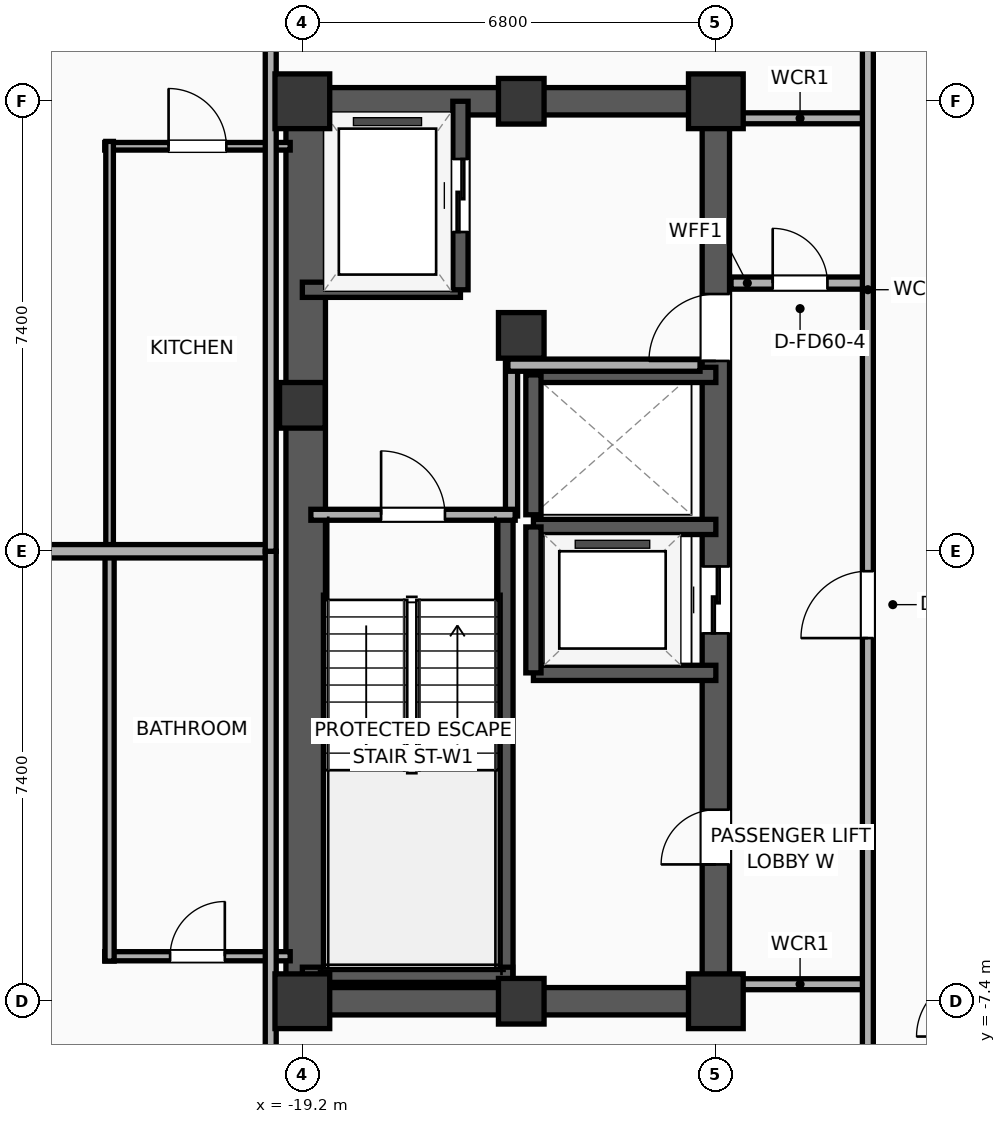
"""IFC4 building model, lengths in metres.
Left out: names, types, materials, properties, quantities, classifications, styles, units other than length and angle.
Written with IfcOpenShell. Run it as: python <this file> out.ifc"""

import sys

from ifc_helpers import new_model, si_unit, direction, frame, frame_2d, origin, origin_2d, place, context, subcontext, project, spatial, rectangle, extrude, element, fill, save


model = new_model("IFC4")
c1 = context("Model", 3, precision=1e-05, world=origin(), true_north=direction((0.0, 1.0)))
c2 = subcontext(c1, "Body", "Model", "MODEL_VIEW")
j1 = project(units=[si_unit("LENGTHUNIT", "METRE"), si_unit("PLANEANGLEUNIT", "RADIAN")], contexts=[c1])
p1 = place(None, origin())
s1 = spatial("IfcSite", under=j1, at=p1, CompositionType="ELEMENT")
p2 = place(p1, origin())
s2 = spatial("IfcBuilding", under=s1, at=p2, CompositionType="ELEMENT")
p3 = place(p2, frame((0.0, 0.0, 187.2)))
s3 = spatial("IfcBuildingStorey", under=s2, at=p3, CompositionType="ELEMENT", Elevation=187.2)
p4 = place(p3, frame((-19.2, -7.4, 0.0), z_axis=(0.0, 0.0, 1.0), x_axis=(1.0, 0.0, 0.0)))
e1 = element("IfcColumn", 1, at=p4, inside=s3, PredefinedType="COLUMN", context=c2, shape_type="SweptSolid", body=[
    extrude(rectangle(XDim=0.9, YDim=0.9, at=origin_2d()), origin(), (0.0, 0.0, 1.0), 3.9),
])
p5 = place(p3, frame((-19.2, 2.4, 0.0), z_axis=(0.0, 0.0, 1.0), x_axis=(1.0, 0.0, 0.0)))
e2 = element("IfcColumn", 2, at=p5, inside=s3, PredefinedType="COLUMN", context=c2, shape_type="SweptSolid", body=[
    extrude(rectangle(XDim=0.75, YDim=0.75, at=origin_2d()), origin(), (0.0, 0.0, 1.0), 3.9),
])
p6 = place(p3, frame((-19.2, 7.4, 0.0), z_axis=(0.0, 0.0, 1.0), x_axis=(1.0, 0.0, 0.0)))
e3 = element("IfcColumn", 3, at=p6, inside=s3, PredefinedType="COLUMN", context=c2, shape_type="SweptSolid", body=[
    extrude(rectangle(XDim=0.9, YDim=0.9, at=origin_2d()), origin(), (0.0, 0.0, 1.0), 3.9),
])
for number, where, z_axis, x_axis in (
    (4, (-15.6, -7.4, 0.0), (0.0, 0.0, 1.0), (1.0, 0.0, 0.0)),
    (5, (-15.6, 7.4, 0.0), (0.0, 0.0, 1.0), (1.0, 0.0, 0.0)),
):
    element("IfcColumn", number, at=place(p3, frame(where, z_axis=z_axis, x_axis=x_axis)), inside=s3, PredefinedType="COLUMN", context=c2, shape_type="SweptSolid", body=[
        extrude(rectangle(XDim=0.75, YDim=0.75, at=origin_2d()), origin(), (0.0, 0.0, 1.0), 3.9),
    ])
p7 = place(p3, frame((-12.4, -7.4, 0.0), z_axis=(0.0, 0.0, 1.0), x_axis=(1.0, 0.0, 0.0)))
e6 = element("IfcColumn", 6, at=p7, inside=s3, PredefinedType="COLUMN", context=c2, shape_type="SweptSolid", body=[
    extrude(rectangle(XDim=0.9, YDim=0.9, at=origin_2d()), origin(), (0.0, 0.0, 1.0), 3.9),
])
p8 = place(p3, frame((-15.6, 3.55, 0.0), z_axis=(0.0, 0.0, 1.0), x_axis=(1.0, 0.0, 0.0)))
e7 = element("IfcColumn", 7, at=p8, inside=s3, PredefinedType="COLUMN", context=c2, shape_type="SweptSolid", body=[
    extrude(rectangle(XDim=0.75, YDim=0.75, at=origin_2d()), origin(), (0.0, 0.0, 1.0), 3.9),
])
p9 = place(p3, frame((-12.4, 7.4, 0.0), z_axis=(0.0, 0.0, 1.0), x_axis=(1.0, 0.0, 0.0)))
e8 = element("IfcColumn", 8, at=p9, inside=s3, PredefinedType="COLUMN", context=c2, shape_type="SweptSolid", body=[
    extrude(rectangle(XDim=0.9, YDim=0.9, at=origin_2d()), origin(), (0.0, 0.0, 1.0), 3.9),
])
for number, where, z_axis, x_axis in (
    (9, (-19.425, -7.4, 0.0), (0.0, 0.0, 1.0), (1.0, 0.0, 0.0)),
    (10, (-19.425, 7.4, 0.0), (0.0, 0.0, 1.0), (1.0, 0.0, 0.0)),
):
    element("IfcWall", number, at=place(p3, frame(where, z_axis=z_axis, x_axis=x_axis)), inside=s3, PredefinedType="SHEAR", context=c2, shape_type="SweptSolid", body=[
        extrude(rectangle(XDim=7.25, YDim=0.45, at=frame_2d((3.625, 0.0))), origin(), (0.0, 0.0, 1.0), 3.65),
    ])
p10 = place(p3, frame((-19.145, -7.4, 0.0), z_axis=(0.0, 0.0, 1.0), x_axis=(0.0, 1.0, 0.0)))
e11 = element("IfcWall", 11, at=p10, inside=s3, PredefinedType="SHEAR", context=c2, shape_type="SweptSolid", body=[
    extrude(rectangle(XDim=14.8, YDim=0.65, at=frame_2d((7.4, 0.0))), origin(), (0.0, 0.0, 1.0), 3.65),
])
p11 = place(p3, frame((-12.4, -7.4, 0.0), z_axis=(0.0, 0.0, 1.0), x_axis=(0.0, 1.0, 0.0)))
e12 = element("IfcWall", 12, at=p11, inside=s3, PredefinedType="SHEAR", context=c2, shape_type="SweptSolid", body=[
    extrude(rectangle(XDim=14.8, YDim=0.45, at=frame_2d((7.4, 0.0))), origin(), (0.0, 0.0, 1.0), 3.65),
])
p12 = place(p11, frame((6.05, 0.0, 0.0)))
e13 = element("IfcOpeningElement", 13, at=p12, cuts=e12, PredefinedType="OPENING", context=c2, shape_type="SweptSolid", body=[
    extrude(rectangle(XDim=1.1, YDim=2.05, at=frame_2d((0.55, 1.025))), frame((0.0, 0.235, 0.0), z_axis=(0.0, -1.0, 0.0), x_axis=(1.0, 0.0, 0.0)), (0.0, 0.0, 1.0), 0.47),
])
p13 = place(p11, frame((10.53, 0.0, 0.0)))
e14 = element("IfcOpeningElement", 14, at=p13, cuts=e12, PredefinedType="OPENING", context=c2, shape_type="SweptSolid", body=[
    extrude(rectangle(XDim=1.1, YDim=2.05, at=frame_2d((0.55, 1.025))), frame((0.0, 0.235, 0.0), z_axis=(0.0, -1.0, 0.0), x_axis=(1.0, 0.0, 0.0)), (0.0, 0.0, 1.0), 0.47),
])
p14 = place(p11, frame((2.25, 0.0, 0.0)))
e15 = element("IfcOpeningElement", 15, at=p14, cuts=e12, PredefinedType="OPENING", context=c2, shape_type="SweptSolid", body=[
    extrude(rectangle(XDim=0.9, YDim=2.05, at=frame_2d((0.45, 1.025))), frame((0.0, 0.235, 0.0), z_axis=(0.0, -1.0, 0.0), x_axis=(1.0, 0.0, 0.0)), (0.0, 0.0, 1.0), 0.47),
])
p15 = place(p3, frame((-15.86, -7.085, 0.0), z_axis=(0.0, 0.0, 1.0), x_axis=(0.0, 1.0, 0.0)))
e16 = element("IfcWall", 16, at=p15, inside=s3, PredefinedType="SOLIDWALL", context=c2, shape_type="SweptSolid", body=[
    extrude(rectangle(XDim=7.685, YDim=0.25, at=frame_2d((3.843, 0.0))), origin(), (0.0, 0.0, 1.0), 3.65),
])
p16 = place(p3, frame((-19.2, -6.965, 0.0), z_axis=(0.0, 0.0, 1.0), x_axis=(1.0, 0.0, 0.0)))
e17 = element("IfcWall", 17, at=p16, inside=s3, PredefinedType="SOLIDWALL", context=c2, shape_type="SweptSolid", body=[
    extrude(rectangle(XDim=3.46, YDim=0.25, at=frame_2d((1.73, 0.0))), origin(), (0.0, 0.0, 1.0), 3.65),
])
p17 = place(p3, frame((-19.2, 4.3, 0.0), z_axis=(0.0, 0.0, 1.0), x_axis=(1.0, 0.0, 0.0)))
e18 = element("IfcWall", 18, at=p17, inside=s3, PredefinedType="SOLIDWALL", context=c2, shape_type="SweptSolid", body=[
    extrude(rectangle(XDim=2.6, YDim=0.25, at=frame_2d((1.3, 0.0))), origin(), (0.0, 0.0, 1.0), 3.65),
])
p18 = place(p3, frame((-16.6, 4.3, 0.0), z_axis=(0.0, 0.0, 1.0), x_axis=(0.0, 1.0, 0.0)))
e19 = element("IfcWall", 19, at=p18, inside=s3, PredefinedType="SOLIDWALL", context=c2, shape_type="SweptSolid", body=[
    extrude(rectangle(XDim=3.1, YDim=0.25, at=frame_2d((1.55, 0.0))), origin(), (0.0, 0.0, 1.0), 3.65),
])
p19 = place(p18, frame((0.95, 0.0, 0.0)))
e20 = element("IfcOpeningElement", 20, at=p19, cuts=e19, PredefinedType="OPENING", context=c2, shape_type="SweptSolid", body=[
    extrude(rectangle(XDim=1.2, YDim=2.05, at=frame_2d((0.6, 1.025))), frame((0.0, 0.135, 0.0), z_axis=(0.0, -1.0, 0.0), x_axis=(1.0, 0.0, 0.0)), (0.0, 0.0, 1.0), 0.27),
])
for number, where, z_axis, x_axis in (
    (21, (-15.4, -2.0, 0.0), (0.0, 0.0, 1.0), (1.0, 0.0, 0.0)),
    (22, (-12.4, 0.4, 0.0), (0.0, 0.0, 1.0), (-1.0, 0.0, 0.0)),
):
    element("IfcWall", number, at=place(p3, frame(where, z_axis=z_axis, x_axis=x_axis)), inside=s3, PredefinedType="SOLIDWALL", context=c2, shape_type="SweptSolid", body=[
        extrude(rectangle(XDim=3.0, YDim=0.25, at=frame_2d((1.5, 0.0))), origin(), (0.0, 0.0, 1.0), 3.65),
    ])
p20 = place(p3, frame((-15.4, 0.4, 0.0), z_axis=(0.0, 0.0, 1.0), x_axis=(0.0, -1.0, 0.0)))
e23 = element("IfcWall", 23, at=p20, inside=s3, PredefinedType="SOLIDWALL", context=c2, shape_type="SweptSolid", body=[
    extrude(rectangle(XDim=2.4, YDim=0.25, at=frame_2d((1.2, 0.0))), origin(), (0.0, 0.0, 1.0), 3.65),
])
p21 = place(p3, frame((-12.4, 2.9, 0.0), z_axis=(0.0, 0.0, 1.0), x_axis=(-1.0, 0.0, 0.0)))
e24 = element("IfcWall", 24, at=p21, inside=s3, PredefinedType="SOLIDWALL", context=c2, shape_type="SweptSolid", body=[
    extrude(rectangle(XDim=3.0, YDim=0.25, at=frame_2d((1.5, 0.0))), origin(), (0.0, 0.0, 1.0), 3.65),
])
p22 = place(p3, frame((-15.4, 2.9, 0.0), z_axis=(0.0, 0.0, 1.0), x_axis=(0.0, -1.0, 0.0)))
e25 = element("IfcWall", 25, at=p22, inside=s3, PredefinedType="SOLIDWALL", context=c2, shape_type="SweptSolid", body=[
    extrude(rectangle(XDim=2.3, YDim=0.25, at=frame_2d((1.15, 0.0))), origin(), (0.0, 0.0, 1.0), 3.65),
])
p23 = place(p3, frame((-15.76, 0.58, 0.0), z_axis=(0.0, 0.0, 1.0), x_axis=(0.0, 1.0, 0.0)))
e26 = element("IfcWall", 26, at=p23, inside=s3, PredefinedType="PARTITIONING", context=c2, shape_type="SweptSolid", body=[
    extrude(rectangle(XDim=2.52, YDim=0.2, at=frame_2d((1.26, 0.0))), origin(), (0.0, 0.0, 1.0), 3.65),
])
p24 = place(p3, frame((-15.82, 3.06, 0.0), z_axis=(0.0, 0.0, 1.0), x_axis=(1.0, 0.0, 0.0)))
e27 = element("IfcWall", 27, at=p24, inside=s3, PredefinedType="PARTITIONING", context=c2, shape_type="SweptSolid", body=[
    extrude(rectangle(XDim=3.16, YDim=0.2, at=frame_2d((1.58, 0.0))), origin(), (0.0, 0.0, 1.0), 3.65),
])
p25 = place(p3, frame((-19.06, 0.6, 0.0), z_axis=(0.0, 0.0, 1.0), x_axis=(1.0, 0.0, 0.0)))
e28 = element("IfcWall", 28, at=p25, inside=s3, PredefinedType="PARTITIONING", context=c2, shape_type="SweptSolid", body=[
    extrude(rectangle(XDim=3.36, YDim=0.18, at=frame_2d((1.68, 0.0))), origin(), (0.0, 0.0, 1.0), 3.65),
])
p26 = place(p25, frame((1.155, 0.0, 0.0)))
e29 = element("IfcOpeningElement", 29, at=p26, cuts=e28, PredefinedType="OPENING", context=c2, shape_type="SweptSolid", body=[
    extrude(rectangle(XDim=1.05, YDim=2.05, at=frame_2d((0.525, 1.025))), frame((0.0, 0.1, 0.0), z_axis=(0.0, -1.0, 0.0), x_axis=(1.0, 0.0, 0.0)), (0.0, 0.0, 1.0), 0.2),
])
p27 = place(p3, frame((-12.15, 4.41, 0.0), z_axis=(0.0, 0.0, 1.0), x_axis=(1.0, 0.0, 0.0)))
e30 = element("IfcWall", 30, at=p27, inside=s3, PredefinedType="PARTITIONING", context=c2, shape_type="SweptSolid", body=[
    extrude(rectangle(XDim=2.27, YDim=0.2, at=frame_2d((1.135, 0.0))), origin(), (0.0, 0.0, 1.0), 3.65),
])
p28 = place(p27, frame((0.685, 0.0, 0.0)))
e31 = element("IfcOpeningElement", 31, at=p28, cuts=e30, PredefinedType="OPENING", context=c2, shape_type="SweptSolid", body=[
    extrude(rectangle(XDim=0.9, YDim=2.05, at=frame_2d((0.45, 1.025))), frame((0.0, 0.11, 0.0), z_axis=(0.0, -1.0, 0.0), x_axis=(1.0, 0.0, 0.0)), (0.0, 0.0, 1.0), 0.22),
])
for number, where, z_axis, x_axis in (
    (32, (-12.15, 7.12, 0.0), (0.0, 0.0, 1.0), (1.0, 0.0, 0.0)),
    (33, (-12.15, -7.12, 0.0), (0.0, 0.0, 1.0), (1.0, 0.0, 0.0)),
):
    element("IfcWall", number, at=place(p3, frame(where, z_axis=z_axis, x_axis=x_axis)), inside=s3, PredefinedType="PARTITIONING", context=c2, shape_type="SweptSolid", body=[
        extrude(rectangle(XDim=2.27, YDim=0.18, at=frame_2d((1.135, 0.0))), origin(), (0.0, 0.0, 1.0), 3.65),
    ])
p29 = place(p3, frame((-9.9, -8.78, 0.0), z_axis=(0.0, 0.0, 1.0), x_axis=(0.0, 1.0, 0.0)))
e34 = element("IfcWall", 34, at=p29, inside=s3, PredefinedType="PARTITIONING", context=c2, shape_type="SweptSolid", body=[
    extrude(rectangle(XDim=17.56, YDim=0.18, at=frame_2d((8.78, 0.0))), origin(), (0.0, 0.0, 1.0), 3.65),
])
p30 = place(p29, frame((7.352, 0.0, 0.0)))
e35 = element("IfcOpeningElement", 35, at=p30, cuts=e34, PredefinedType="OPENING", context=c2, shape_type="SweptSolid", body=[
    extrude(rectangle(XDim=1.1, YDim=2.05, at=frame_2d((0.55, 1.025))), frame((0.0, 0.1, 0.0), z_axis=(0.0, -1.0, 0.0), x_axis=(1.0, 0.0, 0.0)), (0.0, 0.0, 1.0), 0.2),
])
p31 = place(p3, frame((-22.45, -6.66, 0.0), z_axis=(0.0, 0.0, 1.0), x_axis=(1.0, 0.0, 0.0)))
e36 = element("IfcWall", 36, at=p31, inside=s3, PredefinedType="PLUMBINGWALL", context=c2, shape_type="SweptSolid", body=[
    extrude(rectangle(XDim=3.05, YDim=0.15, at=frame_2d((1.525, 0.0))), origin(), (0.0, 0.0, 1.0), 3.65),
])
p32 = place(p31, frame((1.075, 0.0, 0.0)))
e37 = element("IfcOpeningElement", 37, at=p32, cuts=e36, PredefinedType="OPENING", context=c2, shape_type="SweptSolid", body=[
    extrude(rectangle(XDim=0.9, YDim=2.05, at=frame_2d((0.45, 1.025))), frame((0.0, 0.085, 0.0), z_axis=(0.0, -1.0, 0.0), x_axis=(1.0, 0.0, 0.0)), (0.0, 0.0, 1.0), 0.17),
])
p33 = place(p3, frame((-22.37, -6.74, 0.0), z_axis=(0.0, 0.0, 1.0), x_axis=(0.0, 1.0, 0.0)))
e38 = element("IfcWall", 38, at=p33, inside=s3, PredefinedType="PLUMBINGWALL", context=c2, shape_type="SweptSolid", body=[
    extrude(rectangle(XDim=6.72, YDim=0.15, at=frame_2d((3.36, 0.0))), origin(), (0.0, 0.0, 1.0), 3.65),
])
p34 = place(p3, frame((-22.45, 6.66, 0.0), z_axis=(0.0, 0.0, 1.0), x_axis=(1.0, 0.0, 0.0)))
e39 = element("IfcWall", 39, at=p34, inside=s3, PredefinedType="PARTITIONING", context=c2, shape_type="SweptSolid", body=[
    extrude(rectangle(XDim=3.05, YDim=0.125, at=frame_2d((1.525, 0.0))), origin(), (0.0, 0.0, 1.0), 3.04),
])
p35 = place(p34, frame((1.05, 0.0, 0.0)))
e40 = element("IfcOpeningElement", 40, at=p35, cuts=e39, PredefinedType="OPENING", context=c2, shape_type="SweptSolid", body=[
    extrude(rectangle(XDim=0.95, YDim=2.05, at=frame_2d((0.475, 1.025))), frame((0.0, 0.073, 0.0), z_axis=(0.0, -1.0, 0.0), x_axis=(1.0, 0.0, 0.0)), (0.0, 0.0, 1.0), 0.145),
])
p36 = place(p3, frame((-22.37, 0.02, 0.0), z_axis=(0.0, 0.0, 1.0), x_axis=(0.0, 1.0, 0.0)))
e41 = element("IfcWall", 41, at=p36, inside=s3, PredefinedType="PARTITIONING", context=c2, shape_type="SweptSolid", body=[
    extrude(rectangle(XDim=6.72, YDim=0.125, at=frame_2d((3.36, 0.0))), origin(), (0.0, 0.0, 1.0), 3.65),
])
p37 = place(p3, frame((-19.72, 0.0, 0.0), z_axis=(0.0, 0.0, 1.0), x_axis=(-1.0, 0.0, 0.0)))
e42 = element("IfcWall", 42, at=p37, inside=s3, PredefinedType="PARTITIONING", context=c2, shape_type="SweptSolid", body=[
    extrude(rectangle(XDim=13.336, YDim=0.22, at=frame_2d((6.668, 0.0))), origin(), (0.0, 0.0, 1.0), 3.65),
])
p38 = place(p3, frame((-19.72, -22.678, 0.0), z_axis=(0.0, 0.0, 1.0), x_axis=(0.0, 1.0, 0.0)))
e43 = element("IfcWall", 43, at=p38, inside=s3, PredefinedType="PARTITIONING", context=c2, shape_type="SweptSolid", body=[
    extrude(rectangle(XDim=22.678, YDim=0.18, at=frame_2d((11.339, 0.0))), origin(), (0.0, 0.0, 1.0), 3.65),
])
p39 = place(p38, frame((12.798, 0.0, 0.0)))
e44 = element("IfcOpeningElement", 44, at=p39, cuts=e43, PredefinedType="OPENING", context=c2, shape_type="SweptSolid", body=[
    extrude(rectangle(XDim=0.9, YDim=2.05, at=frame_2d((0.45, 1.025))), frame((0.0, 0.1, 0.0), z_axis=(0.0, -1.0, 0.0), x_axis=(1.0, 0.0, 0.0)), (0.0, 0.0, 1.0), 0.2),
])
p40 = place(p3, frame((-19.72, 0.0, 0.0), z_axis=(0.0, 0.0, 1.0), x_axis=(0.0, 1.0, 0.0)))
e45 = element("IfcWall", 45, at=p40, inside=s3, PredefinedType="PARTITIONING", context=c2, shape_type="SweptSolid", body=[
    extrude(rectangle(XDim=18.005, YDim=0.18, at=frame_2d((9.002, 0.0))), origin(), (0.0, 0.0, 1.0), 3.04),
])
p41 = place(p40, frame((8.979, 0.0, 0.0)))
e46 = element("IfcOpeningElement", 46, at=p41, cuts=e45, PredefinedType="OPENING", context=c2, shape_type="SweptSolid", body=[
    extrude(rectangle(XDim=0.9, YDim=2.05, at=frame_2d((0.45, 1.025))), frame((0.0, 0.1, 0.0), z_axis=(0.0, -1.0, 0.0), x_axis=(1.0, 0.0, 0.0)), (0.0, 0.0, 1.0), 0.2),
])
p42 = place(p19, origin())
e47 = element("IfcDoor", 47, at=p42, inside=s3, OperationType="SLIDING_TO_LEFT", PredefinedType="DOOR", context=c2, shape_type="SweptSolid", body=[
    extrude(rectangle(XDim=1.2, YDim=2.05, at=frame_2d((0.6, 1.025))), frame((0.0, 0.025, 0.0), z_axis=(0.0, -1.0, 0.0), x_axis=(1.0, 0.0, 0.0)), (0.0, 0.0, 1.0), 0.05),
])
fill(e20, e47)
p43 = place(p12, origin())
e48 = element("IfcDoor", 48, at=p43, inside=s3, OperationType="SLIDING_TO_LEFT", PredefinedType="DOOR", context=c2, shape_type="SweptSolid", body=[
    extrude(rectangle(XDim=1.1, YDim=2.05, at=frame_2d((0.55, 1.025))), frame((0.0, 0.025, 0.0), z_axis=(0.0, -1.0, 0.0), x_axis=(1.0, 0.0, 0.0)), (0.0, 0.0, 1.0), 0.05),
])
fill(e13, e48)
p44 = place(p26, origin())
e49 = element("IfcDoor", 49, at=p44, inside=s3, OperationType="SINGLE_SWING_LEFT", PredefinedType="DOOR", context=c2, shape_type="SweptSolid", body=[
    extrude(rectangle(XDim=1.05, YDim=2.05, at=frame_2d((0.525, 1.025))), frame((0.0, 0.025, 0.0), z_axis=(0.0, -1.0, 0.0), x_axis=(1.0, 0.0, 0.0)), (0.0, 0.0, 1.0), 0.05),
])
fill(e29, e49)
p45 = place(p28, origin())
e50 = element("IfcDoor", 50, at=p45, inside=s3, OperationType="SINGLE_SWING_LEFT", PredefinedType="DOOR", context=c2, shape_type="SweptSolid", body=[
    extrude(rectangle(XDim=0.9, YDim=2.05, at=frame_2d((0.45, 1.025))), frame((0.0, 0.025, 0.0), z_axis=(0.0, -1.0, 0.0), x_axis=(1.0, 0.0, 0.0)), (0.0, 0.0, 1.0), 0.05),
])
fill(e31, e50)
p46 = place(p30, origin())
e51 = element("IfcDoor", 51, at=p46, inside=s3, OperationType="SINGLE_SWING_LEFT", PredefinedType="DOOR", context=c2, shape_type="SweptSolid", body=[
    extrude(rectangle(XDim=1.1, YDim=2.05, at=frame_2d((0.55, 1.025))), frame((0.0, 0.025, 0.0), z_axis=(0.0, -1.0, 0.0), x_axis=(1.0, 0.0, 0.0)), (0.0, 0.0, 1.0), 0.05),
])
fill(e35, e51)
p47 = place(p32, origin())
e52 = element("IfcDoor", 52, at=p47, inside=s3, OperationType="SINGLE_SWING_RIGHT", PredefinedType="DOOR", context=c2, shape_type="SweptSolid", body=[
    extrude(rectangle(XDim=0.9, YDim=2.05, at=frame_2d((0.45, 1.025))), frame((0.0, 0.025, 0.0), z_axis=(0.0, -1.0, 0.0), x_axis=(1.0, 0.0, 0.0)), (0.0, 0.0, 1.0), 0.05),
])
fill(e37, e52)
p48 = place(p35, origin())
e53 = element("IfcDoor", 53, at=p48, inside=s3, OperationType="SINGLE_SWING_LEFT", PredefinedType="DOOR", context=c2, shape_type="SweptSolid", body=[
    extrude(rectangle(XDim=0.95, YDim=2.05, at=frame_2d((0.475, 1.025))), frame((0.0, 0.025, 0.0), z_axis=(0.0, -1.0, 0.0), x_axis=(1.0, 0.0, 0.0)), (0.0, 0.0, 1.0), 0.05),
])
fill(e40, e53)
p49 = place(p13, origin())
e54 = element("IfcDoor", 54, at=p49, inside=s3, OperationType="SINGLE_SWING_LEFT", PredefinedType="DOOR", context=c2, shape_type="SweptSolid", body=[
    extrude(rectangle(XDim=1.1, YDim=2.05, at=frame_2d((0.55, 1.025))), frame((0.0, 0.025, 0.0), z_axis=(0.0, -1.0, 0.0), x_axis=(1.0, 0.0, 0.0)), (0.0, 0.0, 1.0), 0.05),
])
fill(e14, e54)
p50 = place(p14, origin())
e55 = element("IfcDoor", 55, at=p50, inside=s3, OperationType="SINGLE_SWING_LEFT", PredefinedType="DOOR", context=c2, shape_type="SweptSolid", body=[
    extrude(rectangle(XDim=0.9, YDim=2.05, at=frame_2d((0.45, 1.025))), frame((0.0, 0.025, 0.0), z_axis=(0.0, -1.0, 0.0), x_axis=(1.0, 0.0, 0.0)), (0.0, 0.0, 1.0), 0.05),
])
fill(e15, e55)
save(model, sys.argv[1])
